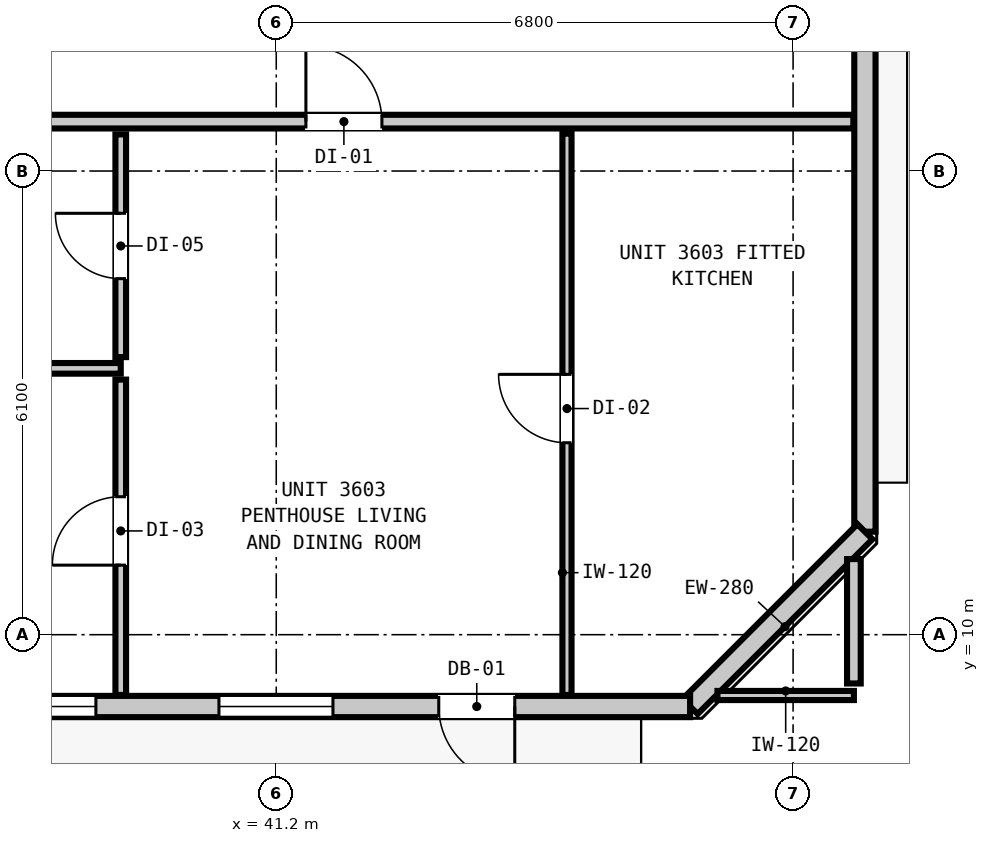
"""IFC4 building model, lengths in metres.
Left out: names, types, materials, properties, quantities, classifications, styles, units other than length and angle.
Written with IfcOpenShell. Run it as: python <this file> out.ifc"""

import sys

from ifc_helpers import new_model, si_unit, direction, frame, frame_2d, origin, place, context, subcontext, project, spatial, rectangle, extrude, element, fill, save


model = new_model("IFC4")
c1 = context("Model", 3, precision=1e-05, world=origin(), true_north=direction((0.0, 1.0)))
c2 = subcontext(c1, "Body", "Model", "MODEL_VIEW")
j1 = project(units=[si_unit("LENGTHUNIT", "METRE"), si_unit("PLANEANGLEUNIT", "RADIAN")], contexts=[c1])
p1 = place(None, origin())
s1 = spatial("IfcSite", under=j1, at=p1, CompositionType="ELEMENT")
p2 = place(p1, origin())
s2 = spatial("IfcBuilding", under=s1, at=p2, CompositionType="ELEMENT")
p3 = place(p2, frame((0.0, 0.0, 126.0)))
s3 = spatial("IfcBuildingStorey", under=s2, at=p3, CompositionType="ELEMENT", Elevation=126.0)
p4 = place(p3, frame((48.945, 43.645, 0.0), z_axis=(0.0, 0.0, 1.0), x_axis=(0.0, -1.0, 0.0)))
e1 = element("IfcWall", 1, at=p4, inside=s3, PredefinedType="STANDARD", context=c2, shape_type="SweptSolid", body=[
    extrude(rectangle(XDim=32.29, YDim=0.28, at=frame_2d((16.145, 0.0))), origin(), (0.0, 0.0, 1.0), 3.08),
])
p5 = place(p4, frame((6.52, 0.0, 0.0)))
e2 = element("IfcOpeningElement", 2, at=p5, cuts=e1, PredefinedType="OPENING", context=c2, shape_type="SweptSolid", body=[
    extrude(rectangle(XDim=1.0, YDim=2.15, at=frame_2d((0.5, 1.075))), frame((0.0, 0.15, 0.0), z_axis=(0.0, -1.0, 0.0), x_axis=(1.0, 0.0, 0.0)), (0.0, 0.0, 1.0), 0.3),
])
p6 = place(p4, frame((0.318, 0.0, 0.85)))
e3 = element("IfcOpeningElement", 3, at=p6, cuts=e1, PredefinedType="OPENING", context=c2, shape_type="SweptSolid", body=[
    extrude(rectangle(XDim=1.05, YDim=1.65, at=frame_2d((0.525, 0.825))), frame((0.0, 0.15, 0.0), z_axis=(0.0, -1.0, 0.0), x_axis=(1.0, 0.0, 0.0)), (0.0, 0.0, 1.0), 0.3),
])
p7 = place(p4, frame((16.674, 0.0, 0.85)))
e4 = element("IfcOpeningElement", 4, at=p7, cuts=e1, PredefinedType="OPENING", context=c2, shape_type="SweptSolid", body=[
    extrude(rectangle(XDim=1.5, YDim=1.8, at=frame_2d((0.75, 0.9))), frame((0.0, 0.15, 0.0), z_axis=(0.0, -1.0, 0.0), x_axis=(1.0, 0.0, 0.0)), (0.0, 0.0, 1.0), 0.3),
])
p8 = place(p4, frame((13.773, 0.0, 0.85)))
e5 = element("IfcOpeningElement", 5, at=p8, cuts=e1, PredefinedType="OPENING", context=c2, shape_type="SweptSolid", body=[
    extrude(rectangle(XDim=1.05, YDim=1.65, at=frame_2d((0.525, 0.825))), frame((0.0, 0.15, 0.0), z_axis=(0.0, -1.0, 0.0), x_axis=(1.0, 0.0, 0.0)), (0.0, 0.0, 1.0), 0.3),
])
p9 = place(p4, frame((7.907, 0.0, 0.85)))
e6 = element("IfcOpeningElement", 6, at=p9, cuts=e1, PredefinedType="OPENING", context=c2, shape_type="SweptSolid", body=[
    extrude(rectangle(XDim=1.5, YDim=1.8, at=frame_2d((0.75, 0.9))), frame((0.0, 0.15, 0.0), z_axis=(0.0, -1.0, 0.0), x_axis=(1.0, 0.0, 0.0)), (0.0, 0.0, 1.0), 0.3),
])
p10 = place(p4, frame((5.043, 0.0, 0.85)))
e7 = element("IfcOpeningElement", 7, at=p10, cuts=e1, PredefinedType="OPENING", context=c2, shape_type="SweptSolid", body=[
    extrude(rectangle(XDim=0.58, YDim=1.5, at=frame_2d((0.29, 0.75))), frame((0.0, 0.15, 0.0), z_axis=(0.0, -1.0, 0.0), x_axis=(1.0, 0.0, 0.0)), (0.0, 0.0, 1.0), 0.3),
])
p11 = place(p3, frame((48.945, 11.355, 0.0), z_axis=(0.0, 0.0, 1.0), x_axis=(-0.707106781187, -0.707106781187, 0.0)))
e8 = element("IfcWall", 8, at=p11, inside=s3, PredefinedType="STANDARD", context=c2, shape_type="SweptSolid", body=[
    extrude(rectangle(XDim=3.253, YDim=0.28, at=frame_2d((1.626, 0.0))), origin(), (0.0, 0.0, 1.0), 3.08),
])
p12 = place(p3, frame((46.645, 9.055, 0.0), z_axis=(0.0, 0.0, 1.0), x_axis=(-1.0, 0.0, 0.0)))
e9 = element("IfcWall", 9, at=p12, inside=s3, PredefinedType="STANDARD", context=c2, shape_type="SweptSolid", body=[
    extrude(rectangle(XDim=35.09, YDim=0.28, at=frame_2d((17.545, 0.0))), origin(), (0.0, 0.0, 1.0), 3.08),
])
p13 = place(p12, frame((2.307, 0.0, 0.0)))
e10 = element("IfcOpeningElement", 10, at=p13, cuts=e9, PredefinedType="OPENING", context=c2, shape_type="SweptSolid", body=[
    extrude(rectangle(XDim=1.0, YDim=2.15, at=frame_2d((0.5, 1.075))), frame((0.0, 0.15, 0.0), z_axis=(0.0, -1.0, 0.0), x_axis=(1.0, 0.0, 0.0)), (0.0, 0.0, 1.0), 0.3),
])
p14 = place(p12, frame((28.795, 0.0, 0.85)))
e11 = element("IfcOpeningElement", 11, at=p14, cuts=e9, PredefinedType="OPENING", context=c2, shape_type="SweptSolid", body=[
    extrude(rectangle(XDim=1.5, YDim=1.8, at=frame_2d((0.75, 0.9))), frame((0.0, 0.15, 0.0), z_axis=(0.0, -1.0, 0.0), x_axis=(1.0, 0.0, 0.0)), (0.0, 0.0, 1.0), 0.3),
])
p15 = place(p12, frame((34.133, 0.0, 0.85)))
e12 = element("IfcOpeningElement", 12, at=p15, cuts=e9, PredefinedType="OPENING", context=c2, shape_type="SweptSolid", body=[
    extrude(rectangle(XDim=0.58, YDim=1.5, at=frame_2d((0.29, 0.75))), frame((0.0, 0.15, 0.0), z_axis=(0.0, -1.0, 0.0), x_axis=(1.0, 0.0, 0.0)), (0.0, 0.0, 1.0), 0.3),
])
p16 = place(p12, frame((15.118, 0.0, 0.85)))
e13 = element("IfcOpeningElement", 13, at=p16, cuts=e9, PredefinedType="OPENING", context=c2, shape_type="SweptSolid", body=[
    extrude(rectangle(XDim=1.5, YDim=1.8, at=frame_2d((0.75, 0.9))), frame((0.0, 0.15, 0.0), z_axis=(0.0, -1.0, 0.0), x_axis=(1.0, 0.0, 0.0)), (0.0, 0.0, 1.0), 0.3),
])
p17 = place(p12, frame((20.357, 0.0, 0.85)))
e14 = element("IfcOpeningElement", 14, at=p17, cuts=e9, PredefinedType="OPENING", context=c2, shape_type="SweptSolid", body=[
    extrude(rectangle(XDim=1.5, YDim=1.8, at=frame_2d((0.75, 0.9))), frame((0.0, 0.15, 0.0), z_axis=(0.0, -1.0, 0.0), x_axis=(1.0, 0.0, 0.0)), (0.0, 0.0, 1.0), 0.3),
])
p18 = place(p12, frame((4.699, 0.0, 0.85)))
e15 = element("IfcOpeningElement", 15, at=p18, cuts=e9, PredefinedType="OPENING", context=c2, shape_type="SweptSolid", body=[
    extrude(rectangle(XDim=1.5, YDim=1.8, at=frame_2d((0.75, 0.9))), frame((0.0, 0.15, 0.0), z_axis=(0.0, -1.0, 0.0), x_axis=(1.0, 0.0, 0.0)), (0.0, 0.0, 1.0), 0.3),
])
p19 = place(p12, frame((7.818, 0.0, 0.85)))
e16 = element("IfcOpeningElement", 16, at=p19, cuts=e9, PredefinedType="OPENING", context=c2, shape_type="SweptSolid", body=[
    extrude(rectangle(XDim=1.5, YDim=1.8, at=frame_2d((0.75, 0.9))), frame((0.0, 0.15, 0.0), z_axis=(0.0, -1.0, 0.0), x_axis=(1.0, 0.0, 0.0)), (0.0, 0.0, 1.0), 0.3),
])
p20 = place(p3, frame((9.407, 16.75, 0.0), z_axis=(0.0, 0.0, 1.0), x_axis=(1.0, 0.0, 0.0)))
e17 = element("IfcWall", 17, at=p20, inside=s3, PredefinedType="PARTITIONING", context=c2, shape_type="SweptSolid", body=[
    extrude(rectangle(XDim=39.386, YDim=0.18, at=frame_2d((19.693, 0.0))), origin(), (0.0, 0.0, 1.0), 3.08),
])
p21 = place(p20, frame((7.193, 0.0, 0.0)))
e18 = element("IfcOpeningElement", 18, at=p21, cuts=e17, PredefinedType="OPENING", context=c2, shape_type="SweptSolid", body=[
    extrude(rectangle(XDim=1.0, YDim=2.15, at=frame_2d((0.5, 1.075))), frame((0.0, 0.1, 0.0), z_axis=(0.0, -1.0, 0.0), x_axis=(1.0, 0.0, 0.0)), (0.0, 0.0, 1.0), 0.2),
])
p22 = place(p20, frame((19.64, 0.0, 0.0)))
e19 = element("IfcOpeningElement", 19, at=p22, cuts=e17, PredefinedType="OPENING", context=c2, shape_type="SweptSolid", body=[
    extrude(rectangle(XDim=1.0, YDim=2.15, at=frame_2d((0.5, 1.075))), frame((0.0, 0.1, 0.0), z_axis=(0.0, -1.0, 0.0), x_axis=(1.0, 0.0, 0.0)), (0.0, 0.0, 1.0), 0.2),
])
p23 = place(p20, frame((32.183, 0.0, 0.0)))
e20 = element("IfcOpeningElement", 20, at=p23, cuts=e17, PredefinedType="OPENING", context=c2, shape_type="SweptSolid", body=[
    extrude(rectangle(XDim=1.0, YDim=2.15, at=frame_2d((0.5, 1.075))), frame((0.0, 0.1, 0.0), z_axis=(0.0, -1.0, 0.0), x_axis=(1.0, 0.0, 0.0)), (0.0, 0.0, 1.0), 0.2),
])
p24 = place(p3, frame((34.82, 13.504, 0.0), z_axis=(0.0, 0.0, 1.0), x_axis=(1.0, 0.0, 0.0)))
e21 = element("IfcWall", 21, at=p24, inside=s3, PredefinedType="PARTITIONING", context=c2, shape_type="SweptSolid", body=[
    extrude(rectangle(XDim=4.334, YDim=0.14, at=frame_2d((2.167, 0.0))), origin(), (0.0, 0.0, 1.0), 3.08),
])
p25 = place(p3, frame((47.005, 9.2, 0.0), z_axis=(0.0, 0.0, 1.0), x_axis=(1.0, 0.0, 0.0)))
e22 = element("IfcWall", 22, at=p25, inside=s3, PredefinedType="PARTITIONING", context=c2, shape_type="SweptSolid", body=[
    extrude(rectangle(XDim=1.795, YDim=0.12, at=frame_2d((0.897, 0.0))), origin(), (0.0, 0.0, 1.0), 3.08),
])
p26 = place(p3, frame((48.8, 9.358, 0.0), z_axis=(0.0, 0.0, 1.0), x_axis=(0.0, 1.0, 0.0)))
e23 = element("IfcWall", 23, at=p26, inside=s3, PredefinedType="PARTITIONING", context=c2, shape_type="SweptSolid", body=[
    extrude(rectangle(XDim=1.637, YDim=0.18, at=frame_2d((0.819, 0.0))), origin(), (0.0, 0.0, 1.0), 3.08),
])
p27 = place(p3, frame((39.154, 9.207, 0.0), z_axis=(0.0, 0.0, 1.0), x_axis=(0.0, 1.0, 0.0)))
e24 = element("IfcWall", 24, at=p27, inside=s3, PredefinedType="PARTITIONING", context=c2, shape_type="SweptSolid", body=[
    extrude(rectangle(XDim=4.149, YDim=0.14, at=frame_2d((2.074, 0.0))), origin(), (0.0, 0.0, 1.0), 3.08),
])
p28 = place(p27, frame((1.708, 0.0, 0.0)))
e25 = element("IfcOpeningElement", 25, at=p28, cuts=e24, PredefinedType="OPENING", context=c2, shape_type="SweptSolid", body=[
    extrude(rectangle(XDim=0.9, YDim=2.1, at=frame_2d((0.45, 1.05))), frame((0.0, 0.08, 0.0), z_axis=(0.0, -1.0, 0.0), x_axis=(1.0, 0.0, 0.0)), (0.0, 0.0, 1.0), 0.16),
])
p29 = place(p3, frame((39.154, 13.652, 0.0), z_axis=(0.0, 0.0, 1.0), x_axis=(0.0, 1.0, 0.0)))
e26 = element("IfcWall", 26, at=p29, inside=s3, PredefinedType="PARTITIONING", context=c2, shape_type="SweptSolid", body=[
    extrude(rectangle(XDim=2.93, YDim=0.14, at=frame_2d((1.465, 0.0))), origin(), (0.0, 0.0, 1.0), 3.08),
])
p30 = place(p29, frame((1.032, 0.0, 0.0)))
e27 = element("IfcOpeningElement", 27, at=p30, cuts=e26, PredefinedType="OPENING", context=c2, shape_type="SweptSolid", body=[
    extrude(rectangle(XDim=0.86, YDim=2.02, at=frame_2d((0.43, 1.01))), frame((0.0, 0.08, 0.0), z_axis=(0.0, -1.0, 0.0), x_axis=(1.0, 0.0, 0.0)), (0.0, 0.0, 1.0), 0.16),
])
p31 = place(p3, frame((45.025, 9.207, 0.0), z_axis=(0.0, 0.0, 1.0), x_axis=(0.0, 1.0, 0.0)))
e28 = element("IfcWall", 28, at=p31, inside=s3, PredefinedType="PARTITIONING", context=c2, shape_type="SweptSolid", body=[
    extrude(rectangle(XDim=7.385, YDim=0.12, at=frame_2d((3.692, 0.0))), origin(), (0.0, 0.0, 1.0), 3.08),
])
p32 = place(p31, frame((3.318, 0.0, 0.0)))
e29 = element("IfcOpeningElement", 29, at=p32, cuts=e28, PredefinedType="OPENING", context=c2, shape_type="SweptSolid", body=[
    extrude(rectangle(XDim=0.9, YDim=2.1, at=frame_2d((0.45, 1.05))), frame((0.0, 0.07, 0.0), z_axis=(0.0, -1.0, 0.0), x_axis=(1.0, 0.0, 0.0)), (0.0, 0.0, 1.0), 0.14),
])
p33 = place(p13, origin())
e30 = element("IfcDoor", 30, at=p33, inside=s3, OperationType="SINGLE_SWING_LEFT", PredefinedType="DOOR", context=c2, shape_type="SweptSolid", body=[
    extrude(rectangle(XDim=1.0, YDim=2.15, at=frame_2d((0.5, 1.075))), frame((0.0, 0.025, 0.0), z_axis=(0.0, -1.0, 0.0), x_axis=(1.0, 0.0, 0.0)), (0.0, 0.0, 1.0), 0.05),
])
fill(e10, e30)
p34 = place(p18, origin())
e31 = element("IfcWindow", 31, at=p34, inside=s3, PartitioningType="SINGLE_PANEL", PredefinedType="WINDOW", context=c2, shape_type="SweptSolid", body=[
    extrude(rectangle(XDim=1.5, YDim=1.8, at=frame_2d((0.75, 0.9))), frame((0.0, 0.03, 0.0), z_axis=(0.0, -1.0, 0.0), x_axis=(1.0, 0.0, 0.0)), (0.0, 0.0, 1.0), 0.06),
])
fill(e15, e31)
p35 = place(p19, origin())
e32 = element("IfcWindow", 32, at=p35, inside=s3, PartitioningType="SINGLE_PANEL", PredefinedType="WINDOW", context=c2, shape_type="SweptSolid", body=[
    extrude(rectangle(XDim=1.5, YDim=1.8, at=frame_2d((0.75, 0.9))), frame((0.0, 0.03, 0.0), z_axis=(0.0, -1.0, 0.0), x_axis=(1.0, 0.0, 0.0)), (0.0, 0.0, 1.0), 0.06),
])
fill(e16, e32)
p36 = place(p23, origin())
e33 = element("IfcDoor", 33, at=p36, inside=s3, OperationType="SINGLE_SWING_LEFT", PredefinedType="DOOR", context=c2, shape_type="SweptSolid", body=[
    extrude(rectangle(XDim=1.0, YDim=2.15, at=frame_2d((0.5, 1.075))), frame((0.0, 0.025, 0.0), z_axis=(0.0, -1.0, 0.0), x_axis=(1.0, 0.0, 0.0)), (0.0, 0.0, 1.0), 0.05),
])
fill(e20, e33)
p37 = place(p30, origin())
e34 = element("IfcDoor", 34, at=p37, inside=s3, OperationType="SINGLE_SWING_RIGHT", PredefinedType="DOOR", context=c2, shape_type="SweptSolid", body=[
    extrude(rectangle(XDim=0.86, YDim=2.02, at=frame_2d((0.43, 1.01))), frame((0.0, 0.025, 0.0), z_axis=(0.0, -1.0, 0.0), x_axis=(1.0, 0.0, 0.0)), (0.0, 0.0, 1.0), 0.05),
])
fill(e27, e34)
p38 = place(p28, origin())
e35 = element("IfcDoor", 35, at=p38, inside=s3, OperationType="SINGLE_SWING_LEFT", PredefinedType="DOOR", context=c2, shape_type="SweptSolid", body=[
    extrude(rectangle(XDim=0.9, YDim=2.1, at=frame_2d((0.45, 1.05))), frame((0.0, 0.025, 0.0), z_axis=(0.0, -1.0, 0.0), x_axis=(1.0, 0.0, 0.0)), (0.0, 0.0, 1.0), 0.05),
])
fill(e25, e35)
p39 = place(p32, origin())
e36 = element("IfcDoor", 36, at=p39, inside=s3, OperationType="SINGLE_SWING_RIGHT", PredefinedType="DOOR", context=c2, shape_type="SweptSolid", body=[
    extrude(rectangle(XDim=0.9, YDim=2.1, at=frame_2d((0.45, 1.05))), frame((0.0, 0.025, 0.0), z_axis=(0.0, -1.0, 0.0), x_axis=(1.0, 0.0, 0.0)), (0.0, 0.0, 1.0), 0.05),
])
fill(e29, e36)
save(model, sys.argv[1])
